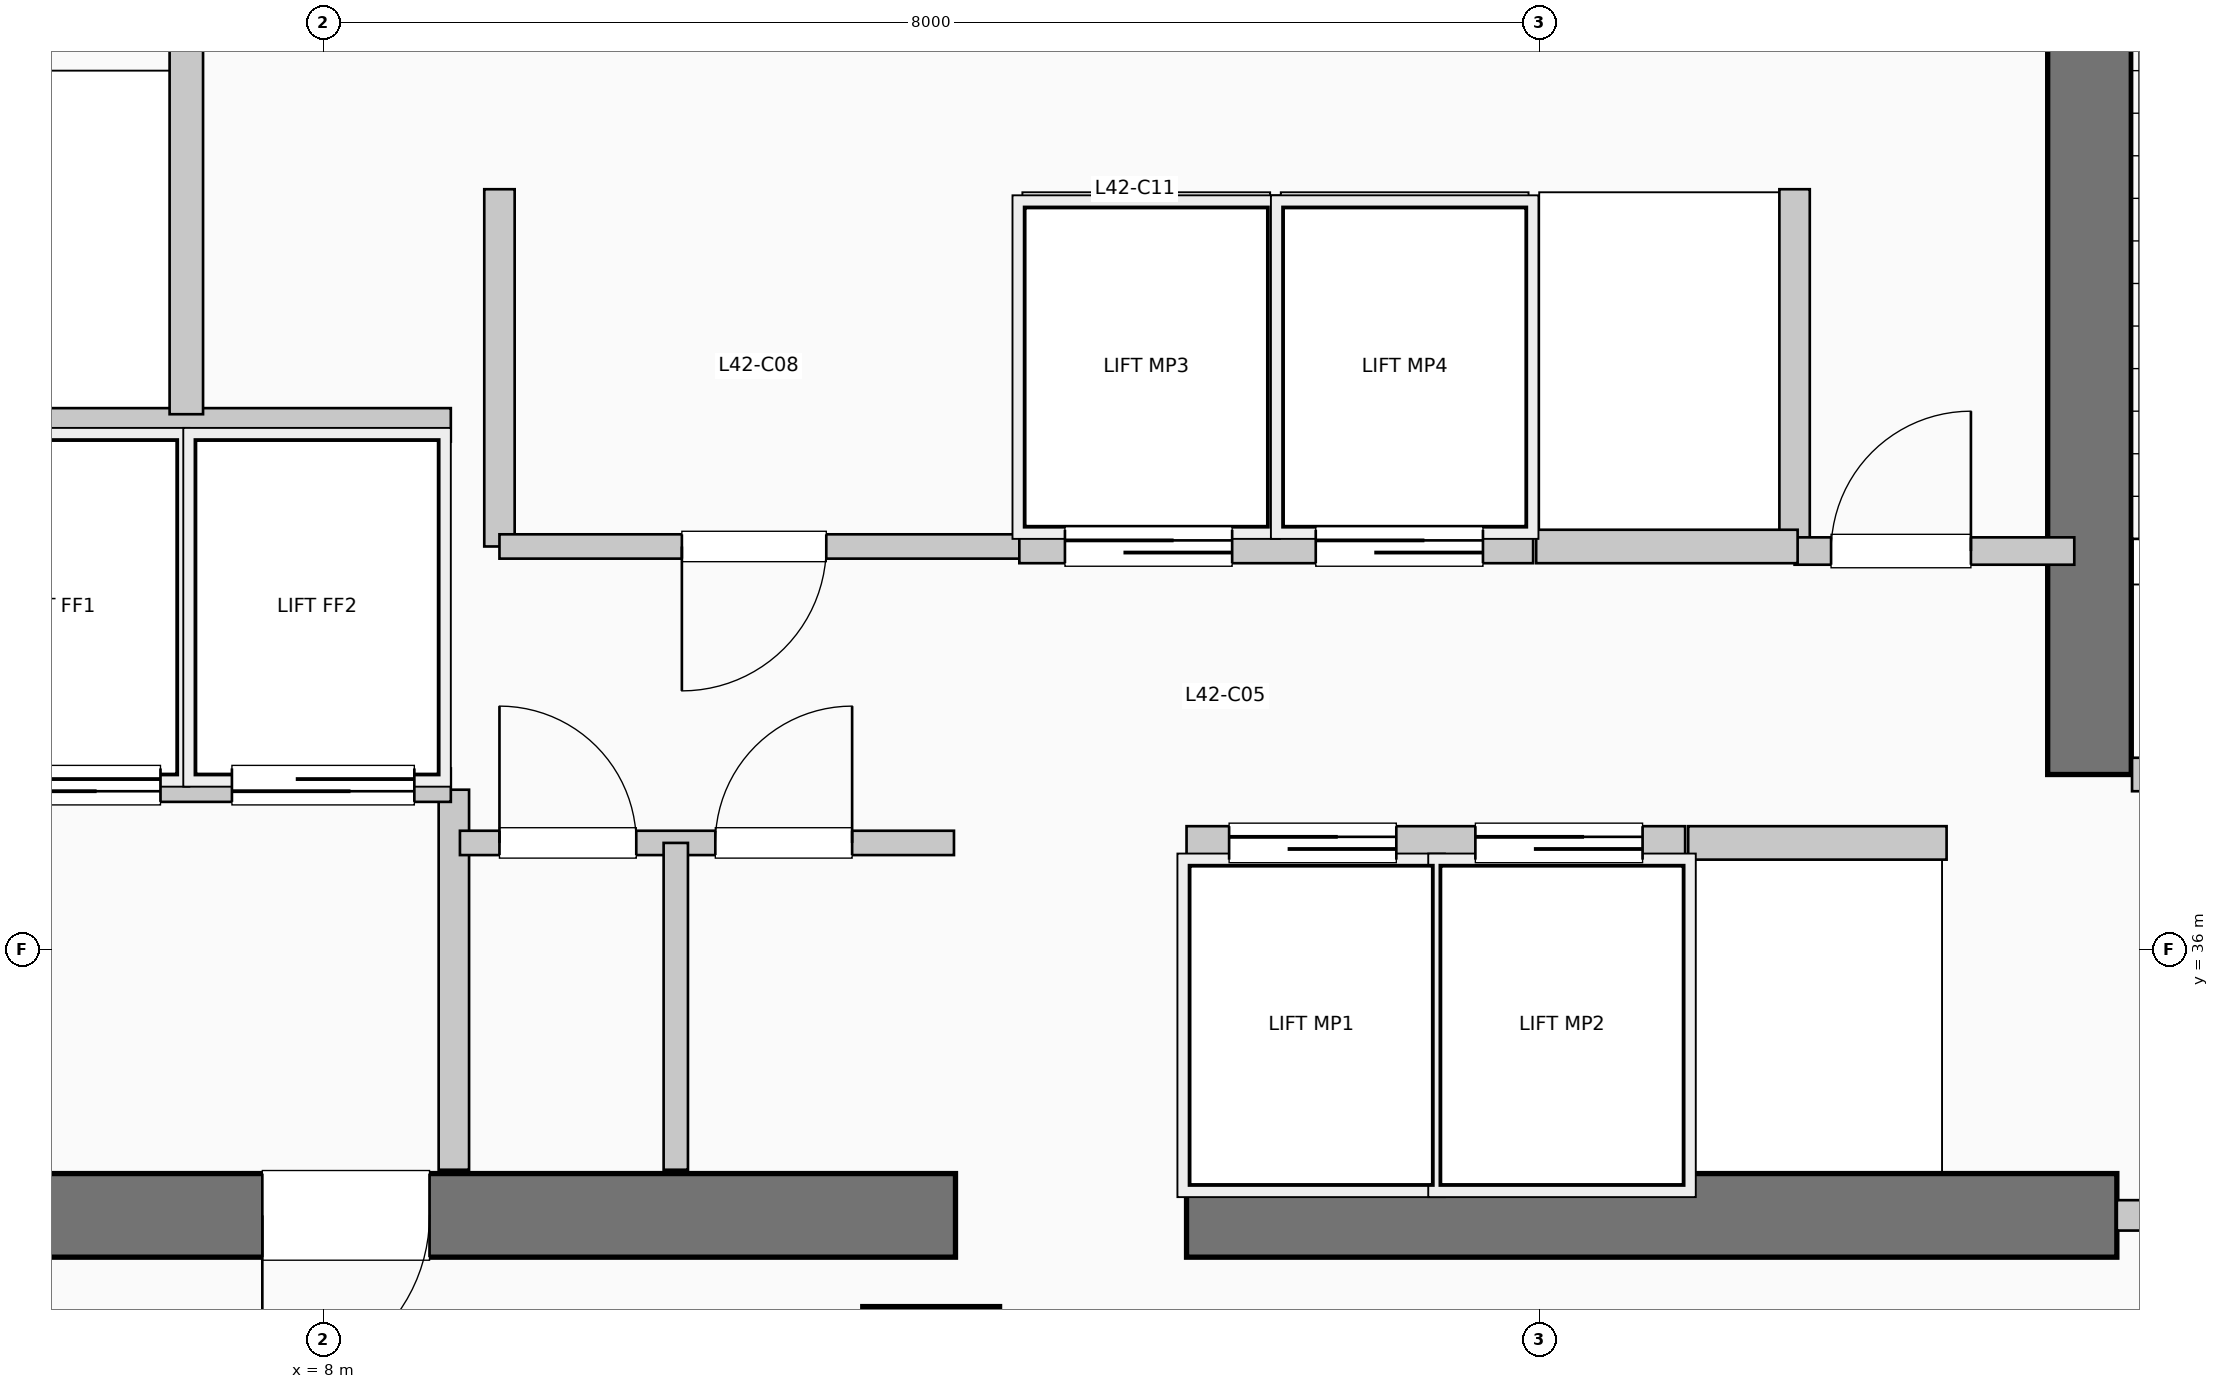
"""IFC4 building model, lengths in metres.
Left out: names, types, materials, properties, quantities, classifications, styles, units other than length and angle.
Written with IfcOpenShell. Run it as: python <this file> out.ifc"""

import sys

from ifc_helpers import new_model, si_unit, direction, frame, frame_2d, origin, origin_2d, place, context, subcontext, project, spatial, rectangle, extrude, element, fill, save


model = new_model("IFC4")
c1 = context("Model", 3, precision=1e-05, world=origin(), true_north=direction((0.0, 1.0)))
c2 = subcontext(c1, "Body", "Model", "MODEL_VIEW")
j1 = project(units=[si_unit("LENGTHUNIT", "METRE"), si_unit("PLANEANGLEUNIT", "RADIAN")], contexts=[c1])
p1 = place(None, origin())
s1 = spatial("IfcSite", under=j1, at=p1, CompositionType="ELEMENT")
p2 = place(p1, origin())
s2 = spatial("IfcBuilding", under=s1, at=p2, CompositionType="ELEMENT")
p3 = place(p2, frame((0.0, 0.0, 174.57)))
s3 = spatial("IfcBuildingStorey", under=s2, at=p3, CompositionType="ELEMENT", Elevation=174.57)
p4 = place(p3, frame((1.45, 34.25, 0.0), z_axis=(0.0, 0.0, 1.0), x_axis=(1.0, 0.0, 0.0)))
e1 = element("IfcWall", 1, at=p4, inside=s3, PredefinedType="SHEAR", context=c2, shape_type="SweptSolid", body=[
    extrude(rectangle(XDim=10.71, YDim=0.55, at=frame_2d((5.355, 0.0))), origin(), (0.0, 0.0, 1.0), 4.95),
])
p5 = place(p4, frame((7.25, 0.0, 0.0), z_axis=(0.0, 0.0, 1.0), x_axis=(-1.0, 0.0, 0.0)))
e2 = element("IfcOpeningElement", 2, at=p5, cuts=e1, PredefinedType="OPENING", context=c2, shape_type="SweptSolid", body=[
    extrude(rectangle(XDim=1.1, YDim=2.15, at=frame_2d((0.55, 1.075))), frame((0.0, 0.285, 0.0), z_axis=(0.0, -1.0, 0.0), x_axis=(1.0, 0.0, 0.0)), (0.0, 0.0, 1.0), 0.57),
])
p6 = place(p3, frame((13.68, 34.25, 0.0), z_axis=(0.0, 0.0, 1.0), x_axis=(1.0, 0.0, 0.0)))
e3 = element("IfcWall", 3, at=p6, inside=s3, PredefinedType="SHEAR", context=c2, shape_type="SweptSolid", body=[
    extrude(rectangle(XDim=6.12, YDim=0.55, at=frame_2d((3.06, 0.0))), origin(), (0.0, 0.0, 1.0), 4.95),
])
p7 = place(p3, frame((19.62, 37.15, 0.0), z_axis=(0.0, 0.0, 1.0), x_axis=(0.0, 1.0, 0.0)))
e4 = element("IfcWall", 4, at=p7, inside=s3, PredefinedType="SHEAR", context=c2, shape_type="SweptSolid", body=[
    extrude(rectangle(XDim=7.89, YDim=0.55, at=frame_2d((3.945, 0.0))), origin(), (0.0, 0.0, 1.0), 4.95),
])
p8 = place(p3, frame((12.0, 33.2, 0.0), z_axis=(0.0, 0.0, 1.0), x_axis=(1.0, 0.0, 0.0)))
e5 = element("IfcColumn", 5, at=p8, inside=s3, PredefinedType="COLUMN", context=c2, shape_type="SweptSolid", body=[
    extrude(rectangle(XDim=0.9, YDim=0.9, at=origin_2d()), origin(), (0.0, 0.0, 1.0), 4.95),
])
p9 = place(p3, frame((8.86, 34.55, 0.0), z_axis=(0.0, 0.0, 1.0), x_axis=(0.0, 1.0, 0.0)))
e6 = element("IfcWall", 6, at=p9, inside=s3, PredefinedType="PARTITIONING", context=c2, shape_type="SweptSolid", body=[
    extrude(rectangle(XDim=2.5, YDim=0.2, at=frame_2d((1.25, 0.0))), origin(), (0.0, 0.0, 1.0), 4.7),
])
p10 = place(p3, frame((19.9, 37.15, 0.0), z_axis=(0.0, 0.0, 1.0), x_axis=(1.0, 0.0, 0.0)))
e7 = element("IfcWall", 7, at=p10, inside=s3, PredefinedType="PARTITIONING", context=c2, shape_type="SweptSolid", body=[
    extrude(rectangle(XDim=3.15, YDim=0.22, at=frame_2d((1.575, 0.0))), origin(), (0.0, 0.0, 1.0), 4.7),
])
p11 = place(p10, frame((2.05, 0.0, 0.0), z_axis=(0.0, 0.0, 1.0), x_axis=(-1.0, 0.0, 0.0)))
e8 = element("IfcOpeningElement", 8, at=p11, cuts=e7, PredefinedType="OPENING", context=c2, shape_type="SweptSolid", body=[
    extrude(rectangle(XDim=1.05, YDim=2.15, at=frame_2d((0.525, 1.075))), frame((0.0, 0.12, 0.0), z_axis=(0.0, -1.0, 0.0), x_axis=(1.0, 0.0, 0.0)), (0.0, 0.0, 1.0), 0.24),
])
p12 = place(p3, frame((19.8, 34.25, 0.0), z_axis=(0.0, 0.0, 1.0), x_axis=(1.0, 0.0, 0.0)))
e9 = element("IfcWall", 9, at=p12, inside=s3, PredefinedType="PARTITIONING", context=c2, shape_type="SweptSolid", body=[
    extrude(rectangle(XDim=3.25, YDim=0.2, at=frame_2d((1.625, 0.0))), origin(), (0.0, 0.0, 1.0), 4.7),
])
p13 = place(p12, frame((2.15, 0.0, 0.0), z_axis=(0.0, 0.0, 1.0), x_axis=(-1.0, 0.0, 0.0)))
e10 = element("IfcOpeningElement", 10, at=p13, cuts=e9, PredefinedType="OPENING", context=c2, shape_type="SweptSolid", body=[
    extrude(rectangle(XDim=1.1, YDim=2.15, at=frame_2d((0.55, 1.075))), frame((0.0, 0.11, 0.0), z_axis=(0.0, -1.0, 0.0), x_axis=(1.0, 0.0, 0.0)), (0.0, 0.0, 1.0), 0.22),
])
p14 = place(p3, frame((5.38, 37.08, 0.0), z_axis=(0.0, 0.0, 1.0), x_axis=(1.0, 0.0, 0.0)))
e11 = element("IfcWall", 11, at=p14, inside=s3, PredefinedType="PARTITIONING", context=c2, shape_type="SweptSolid", body=[
    extrude(rectangle(XDim=3.46, YDim=0.22, at=frame_2d((1.73, 0.0))), origin(), (0.0, 0.0, 1.0), 4.7),
])
p15 = place(p14, frame((1.55, 0.0, 0.0), z_axis=(0.0, 0.0, 1.0), x_axis=(-1.0, 0.0, 0.0)))
e12 = element("IfcOpeningElement", 12, at=p15, cuts=e11, PredefinedType="OPENING", context=c2, shape_type="SweptSolid", body=[
    extrude(rectangle(XDim=1.2, YDim=2.2, at=frame_2d((0.6, 1.1))), frame((0.0, 0.12, 0.0), z_axis=(0.0, -1.0, 0.0), x_axis=(1.0, 0.0, 0.0)), (0.0, 0.0, 1.0), 0.24),
])
p16 = place(p14, frame((3.22, 0.0, 0.0), z_axis=(0.0, 0.0, 1.0), x_axis=(-1.0, 0.0, 0.0)))
e13 = element("IfcOpeningElement", 13, at=p16, cuts=e11, PredefinedType="OPENING", context=c2, shape_type="SweptSolid", body=[
    extrude(rectangle(XDim=1.2, YDim=2.2, at=frame_2d((0.6, 1.1))), frame((0.0, 0.12, 0.0), z_axis=(0.0, -1.0, 0.0), x_axis=(1.0, 0.0, 0.0)), (0.0, 0.0, 1.0), 0.24),
])
p17 = place(p3, frame((5.38, 39.45, 0.0), z_axis=(0.0, 0.0, 1.0), x_axis=(1.0, 0.0, 0.0)))
e14 = element("IfcWall", 14, at=p17, inside=s3, PredefinedType="PARTITIONING", context=c2, shape_type="SweptSolid", body=[
    extrude(rectangle(XDim=3.46, YDim=0.22, at=frame_2d((1.73, 0.0))), origin(), (0.0, 0.0, 1.0), 4.7),
])
p18 = place(p3, frame((7.1, 39.52, 0.0), z_axis=(0.0, 0.0, 1.0), x_axis=(0.0, 1.0, 0.0)))
e15 = element("IfcWall", 15, at=p18, inside=s3, PredefinedType="PARTITIONING", context=c2, shape_type="SweptSolid", body=[
    extrude(rectangle(XDim=2.93, YDim=0.22, at=frame_2d((1.465, 0.0))), origin(), (0.0, 0.0, 1.0), 4.7),
])
for number, where, z_axis, x_axis in (
    (16, (9.16, 38.65, 0.0), (0.0, 0.0, 1.0), (0.0, 1.0, 0.0)),
    (17, (17.68, 38.65, 0.0), (0.0, 0.0, 1.0), (0.0, 1.0, 0.0)),
):
    element("IfcWall", number, at=place(p3, frame(where, z_axis=z_axis, x_axis=x_axis)), inside=s3, PredefinedType="PARTITIONING", context=c2, shape_type="SweptSolid", body=[
        extrude(rectangle(XDim=2.35, YDim=0.2, at=frame_2d((1.175, 0.0))), origin(), (0.0, 0.0, 1.0), 4.7),
    ])
p19 = place(p3, frame((17.68, 38.62, 0.0), z_axis=(0.0, 0.0, 1.0), x_axis=(1.0, 0.0, 0.0)))
e18 = element("IfcWall", 18, at=p19, inside=s3, PredefinedType="PARTITIONING", context=c2, shape_type="SweptSolid", body=[
    extrude(rectangle(XDim=1.84, YDim=0.18, at=frame_2d((0.92, 0.0))), origin(), (0.0, 0.0, 1.0), 4.7),
])
p20 = place(p19, frame((0.24, 0.0, 0.0)))
e19 = element("IfcOpeningElement", 19, at=p20, cuts=e18, PredefinedType="OPENING", context=c2, shape_type="SweptSolid", body=[
    extrude(rectangle(XDim=0.92, YDim=2.1, at=frame_2d((0.46, 1.05))), frame((0.0, 0.1, 0.0), z_axis=(0.0, -1.0, 0.0), x_axis=(1.0, 0.0, 0.0)), (0.0, 0.0, 1.0), 0.2),
])
p21 = place(p3, frame((8.9, 36.7, 0.0), z_axis=(0.0, 0.0, 1.0), x_axis=(1.0, 0.0, 0.0)))
e20 = element("IfcWall", 20, at=p21, inside=s3, PredefinedType="PARTITIONING", context=c2, shape_type="SweptSolid", body=[
    extrude(rectangle(XDim=3.25, YDim=0.16, at=frame_2d((1.625, 0.0))), origin(), (0.0, 0.0, 1.0), 4.7),
])
p22 = place(p21, frame((0.26, 0.0, 0.0)))
e21 = element("IfcOpeningElement", 21, at=p22, cuts=e20, PredefinedType="OPENING", context=c2, shape_type="SweptSolid", body=[
    extrude(rectangle(XDim=0.9, YDim=2.15, at=frame_2d((0.45, 1.075))), frame((0.0, 0.09, 0.0), z_axis=(0.0, -1.0, 0.0), x_axis=(1.0, 0.0, 0.0)), (0.0, 0.0, 1.0), 0.18),
])
p23 = place(p21, frame((1.68, 0.0, 0.0)))
e22 = element("IfcOpeningElement", 22, at=p23, cuts=e20, PredefinedType="OPENING", context=c2, shape_type="SweptSolid", body=[
    extrude(rectangle(XDim=0.9, YDim=2.15, at=frame_2d((0.45, 1.075))), frame((0.0, 0.09, 0.0), z_axis=(0.0, -1.0, 0.0), x_axis=(1.0, 0.0, 0.0)), (0.0, 0.0, 1.0), 0.18),
])
p24 = place(p3, frame((10.32, 34.55, 0.0), z_axis=(0.0, 0.0, 1.0), x_axis=(0.0, 1.0, 0.0)))
e23 = element("IfcWall", 23, at=p24, inside=s3, PredefinedType="PARTITIONING", context=c2, shape_type="SweptSolid", body=[
    extrude(rectangle(XDim=2.15, YDim=0.16, at=frame_2d((1.075, 0.0))), origin(), (0.0, 0.0, 1.0), 4.7),
])
p25 = place(p3, frame((9.16, 38.65, 0.0), z_axis=(0.0, 0.0, 1.0), x_axis=(1.0, 0.0, 0.0)))
e24 = element("IfcWall", 24, at=p25, inside=s3, PredefinedType="PARTITIONING", context=c2, shape_type="SweptSolid", body=[
    extrude(rectangle(XDim=3.42, YDim=0.16, at=frame_2d((1.71, 0.0))), origin(), (0.0, 0.0, 1.0), 4.7),
])
p26 = place(p25, frame((2.15, 0.0, 0.0), z_axis=(0.0, 0.0, 1.0), x_axis=(-1.0, 0.0, 0.0)))
e25 = element("IfcOpeningElement", 25, at=p26, cuts=e24, PredefinedType="OPENING", context=c2, shape_type="SweptSolid", body=[
    extrude(rectangle(XDim=0.95, YDim=2.15, at=frame_2d((0.475, 1.075))), frame((0.0, 0.09, 0.0), z_axis=(0.0, -1.0, 0.0), x_axis=(1.0, 0.0, 0.0)), (0.0, 0.0, 1.0), 0.18),
])
p27 = place(p3, frame((13.68, 36.7, 0.0), z_axis=(0.0, 0.0, 1.0), x_axis=(1.0, 0.0, 0.0)))
e26 = element("IfcWall", 26, at=p27, inside=s3, PredefinedType="PARTITIONING", context=c2, shape_type="SweptSolid", body=[
    extrude(rectangle(XDim=3.28, YDim=0.22, at=frame_2d((1.64, 0.0))), origin(), (0.0, 0.0, 1.0), 4.7),
])
p28 = place(p27, frame((0.28, 0.0, 0.0)))
e27 = element("IfcOpeningElement", 27, at=p28, cuts=e26, PredefinedType="OPENING", context=c2, shape_type="SweptSolid", body=[
    extrude(rectangle(XDim=1.1, YDim=2.2, at=frame_2d((0.55, 1.1))), frame((0.0, 0.12, 0.0), z_axis=(0.0, -1.0, 0.0), x_axis=(1.0, 0.0, 0.0)), (0.0, 0.0, 1.0), 0.24),
])
p29 = place(p27, frame((1.9, 0.0, 0.0)))
e28 = element("IfcOpeningElement", 28, at=p29, cuts=e26, PredefinedType="OPENING", context=c2, shape_type="SweptSolid", body=[
    extrude(rectangle(XDim=1.1, YDim=2.2, at=frame_2d((0.55, 1.1))), frame((0.0, 0.12, 0.0), z_axis=(0.0, -1.0, 0.0), x_axis=(1.0, 0.0, 0.0)), (0.0, 0.0, 1.0), 0.24),
])
p30 = place(p3, frame((12.58, 38.65, 0.0), z_axis=(0.0, 0.0, 1.0), x_axis=(1.0, 0.0, 0.0)))
e29 = element("IfcWall", 29, at=p30, inside=s3, PredefinedType="PARTITIONING", context=c2, shape_type="SweptSolid", body=[
    extrude(rectangle(XDim=3.38, YDim=0.22, at=frame_2d((1.69, 0.0))), origin(), (0.0, 0.0, 1.0), 4.7),
])
p31 = place(p30, frame((0.3, 0.0, 0.0)))
e30 = element("IfcOpeningElement", 30, at=p31, cuts=e29, PredefinedType="OPENING", context=c2, shape_type="SweptSolid", body=[
    extrude(rectangle(XDim=1.1, YDim=2.2, at=frame_2d((0.55, 1.1))), frame((0.0, 0.12, 0.0), z_axis=(0.0, -1.0, 0.0), x_axis=(1.0, 0.0, 0.0)), (0.0, 0.0, 1.0), 0.24),
])
p32 = place(p30, frame((1.95, 0.0, 0.0)))
e31 = element("IfcOpeningElement", 31, at=p32, cuts=e29, PredefinedType="OPENING", context=c2, shape_type="SweptSolid", body=[
    extrude(rectangle(XDim=1.1, YDim=2.2, at=frame_2d((0.55, 1.1))), frame((0.0, 0.12, 0.0), z_axis=(0.0, -1.0, 0.0), x_axis=(1.0, 0.0, 0.0)), (0.0, 0.0, 1.0), 0.24),
])
p33 = place(p3, frame((16.98, 36.7, 0.0), z_axis=(0.0, 0.0, 1.0), x_axis=(1.0, 0.0, 0.0)))
e32 = element("IfcWall", 32, at=p33, inside=s3, PredefinedType="PARTITIONING", context=c2, shape_type="SweptSolid", body=[
    extrude(rectangle(XDim=1.7, YDim=0.22, at=frame_2d((0.85, 0.0))), origin(), (0.0, 0.0, 1.0), 4.7),
])
p34 = place(p3, frame((15.98, 38.65, 0.0), z_axis=(0.0, 0.0, 1.0), x_axis=(1.0, 0.0, 0.0)))
e33 = element("IfcWall", 33, at=p34, inside=s3, PredefinedType="PARTITIONING", context=c2, shape_type="SweptSolid", body=[
    extrude(rectangle(XDim=1.72, YDim=0.22, at=frame_2d((0.86, 0.0))), origin(), (0.0, 0.0, 1.0), 4.7),
])
p35 = place(p5, origin())
e34 = element("IfcDoor", 34, at=p35, inside=s3, OperationType="SINGLE_SWING_LEFT", PredefinedType="DOOR", context=c2, shape_type="SweptSolid", body=[
    extrude(rectangle(XDim=1.1, YDim=2.15, at=frame_2d((0.55, 1.075))), frame((0.0, 0.025, 0.0), z_axis=(0.0, -1.0, 0.0), x_axis=(1.0, 0.0, 0.0)), (0.0, 0.0, 1.0), 0.05),
])
fill(e2, e34)
p36 = place(p15, origin())
e35 = element("IfcDoor", 35, at=p36, inside=s3, OperationType="SLIDING_TO_RIGHT", PredefinedType="DOOR", context=c2, shape_type="SweptSolid", body=[
    extrude(rectangle(XDim=1.2, YDim=2.2, at=frame_2d((0.6, 1.1))), frame((0.0, 0.025, 0.0), z_axis=(0.0, -1.0, 0.0), x_axis=(1.0, 0.0, 0.0)), (0.0, 0.0, 1.0), 0.05),
])
fill(e12, e35)
p37 = place(p16, origin())
e36 = element("IfcDoor", 36, at=p37, inside=s3, OperationType="SLIDING_TO_RIGHT", PredefinedType="DOOR", context=c2, shape_type="SweptSolid", body=[
    extrude(rectangle(XDim=1.2, YDim=2.2, at=frame_2d((0.6, 1.1))), frame((0.0, 0.025, 0.0), z_axis=(0.0, -1.0, 0.0), x_axis=(1.0, 0.0, 0.0)), (0.0, 0.0, 1.0), 0.05),
])
fill(e13, e36)
p38 = place(p20, origin())
e37 = element("IfcDoor", 37, at=p38, inside=s3, OperationType="SINGLE_SWING_RIGHT", PredefinedType="DOOR", context=c2, shape_type="SweptSolid", body=[
    extrude(rectangle(XDim=0.92, YDim=2.1, at=frame_2d((0.46, 1.05))), frame((0.0, 0.025, 0.0), z_axis=(0.0, -1.0, 0.0), x_axis=(1.0, 0.0, 0.0)), (0.0, 0.0, 1.0), 0.05),
])
fill(e19, e37)
p39 = place(p22, origin())
e38 = element("IfcDoor", 38, at=p39, inside=s3, OperationType="SINGLE_SWING_LEFT", PredefinedType="DOOR", context=c2, shape_type="SweptSolid", body=[
    extrude(rectangle(XDim=0.9, YDim=2.15, at=frame_2d((0.45, 1.075))), frame((0.0, 0.025, 0.0), z_axis=(0.0, -1.0, 0.0), x_axis=(1.0, 0.0, 0.0)), (0.0, 0.0, 1.0), 0.05),
])
fill(e21, e38)
p40 = place(p23, origin())
e39 = element("IfcDoor", 39, at=p40, inside=s3, OperationType="SINGLE_SWING_RIGHT", PredefinedType="DOOR", context=c2, shape_type="SweptSolid", body=[
    extrude(rectangle(XDim=0.9, YDim=2.15, at=frame_2d((0.45, 1.075))), frame((0.0, 0.025, 0.0), z_axis=(0.0, -1.0, 0.0), x_axis=(1.0, 0.0, 0.0)), (0.0, 0.0, 1.0), 0.05),
])
fill(e22, e39)
p41 = place(p26, origin())
e40 = element("IfcDoor", 40, at=p41, inside=s3, OperationType="SINGLE_SWING_LEFT", PredefinedType="DOOR", context=c2, shape_type="SweptSolid", body=[
    extrude(rectangle(XDim=0.95, YDim=2.15, at=frame_2d((0.475, 1.075))), frame((0.0, 0.025, 0.0), z_axis=(0.0, -1.0, 0.0), x_axis=(1.0, 0.0, 0.0)), (0.0, 0.0, 1.0), 0.05),
])
fill(e25, e40)
p42 = place(p28, origin())
e41 = element("IfcDoor", 41, at=p42, inside=s3, OperationType="SLIDING_TO_RIGHT", PredefinedType="DOOR", context=c2, shape_type="SweptSolid", body=[
    extrude(rectangle(XDim=1.1, YDim=2.2, at=frame_2d((0.55, 1.1))), frame((0.0, 0.025, 0.0), z_axis=(0.0, -1.0, 0.0), x_axis=(1.0, 0.0, 0.0)), (0.0, 0.0, 1.0), 0.05),
])
fill(e27, e41)
p43 = place(p29, origin())
e42 = element("IfcDoor", 42, at=p43, inside=s3, OperationType="SLIDING_TO_RIGHT", PredefinedType="DOOR", context=c2, shape_type="SweptSolid", body=[
    extrude(rectangle(XDim=1.1, YDim=2.2, at=frame_2d((0.55, 1.1))), frame((0.0, 0.025, 0.0), z_axis=(0.0, -1.0, 0.0), x_axis=(1.0, 0.0, 0.0)), (0.0, 0.0, 1.0), 0.05),
])
fill(e28, e42)
p44 = place(p31, origin())
e43 = element("IfcDoor", 43, at=p44, inside=s3, OperationType="SLIDING_TO_RIGHT", PredefinedType="DOOR", context=c2, shape_type="SweptSolid", body=[
    extrude(rectangle(XDim=1.1, YDim=2.2, at=frame_2d((0.55, 1.1))), frame((0.0, 0.025, 0.0), z_axis=(0.0, -1.0, 0.0), x_axis=(1.0, 0.0, 0.0)), (0.0, 0.0, 1.0), 0.05),
])
fill(e30, e43)
p45 = place(p32, origin())
e44 = element("IfcDoor", 44, at=p45, inside=s3, OperationType="SLIDING_TO_RIGHT", PredefinedType="DOOR", context=c2, shape_type="SweptSolid", body=[
    extrude(rectangle(XDim=1.1, YDim=2.2, at=frame_2d((0.55, 1.1))), frame((0.0, 0.025, 0.0), z_axis=(0.0, -1.0, 0.0), x_axis=(1.0, 0.0, 0.0)), (0.0, 0.0, 1.0), 0.05),
])
fill(e31, e44)
save(model, sys.argv[1])
